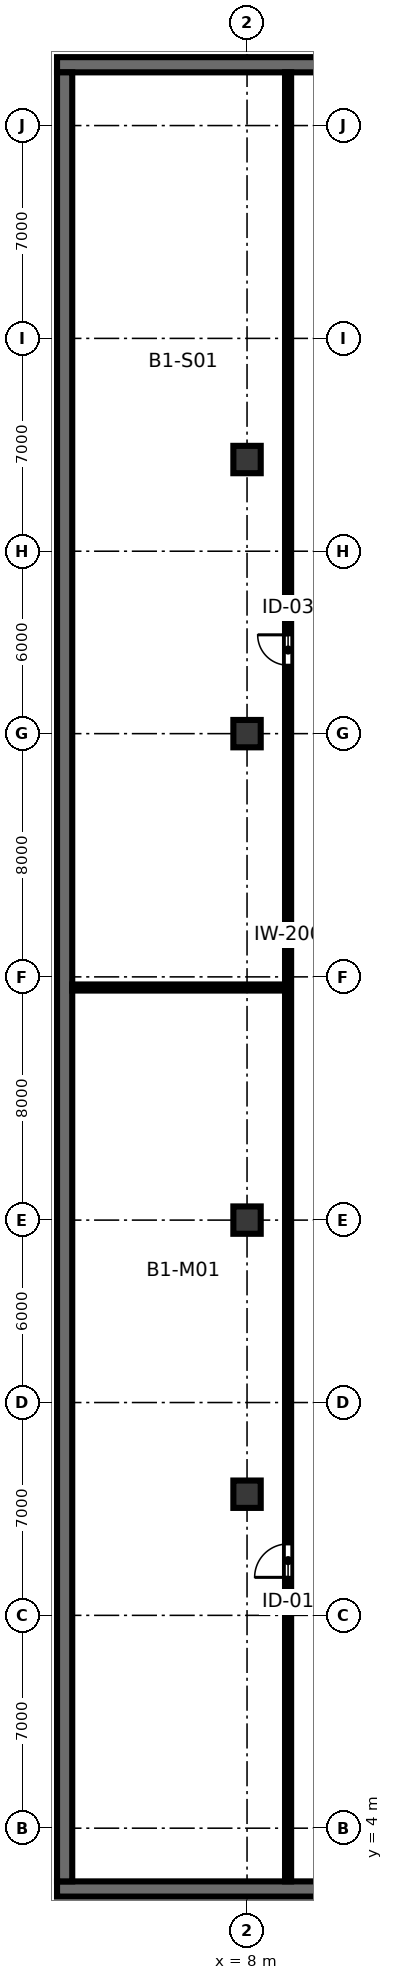
"""IFC4 building model, lengths in metres.
Left out: names, types, materials, properties, quantities, classifications, styles, units other than length and angle.
Written with IfcOpenShell. Run it as: python <this file> out.ifc"""

import sys

from ifc_helpers import new_model, si_unit, direction, frame, frame_2d, origin, origin_2d, place, context, subcontext, project, spatial, rectangle, extrude, element, fill, save


model = new_model("IFC4")
c1 = context("Model", 3, precision=1e-05, world=origin(), true_north=direction((0.0, 1.0)))
c2 = subcontext(c1, "Body", "Model", "MODEL_VIEW")
j1 = project(units=[si_unit("LENGTHUNIT", "METRE"), si_unit("PLANEANGLEUNIT", "RADIAN")], contexts=[c1])
p1 = place(None, origin())
s1 = spatial("IfcSite", under=j1, at=p1, CompositionType="ELEMENT")
p2 = place(p1, origin())
s2 = spatial("IfcBuilding", under=s1, at=p2, CompositionType="ELEMENT")
p3 = place(p2, frame((0.0, 0.0, -4.2)))
s3 = spatial("IfcBuildingStorey", under=s2, at=p3, CompositionType="ELEMENT", Elevation=-4.2)
for number, where, z_axis, x_axis in (
    (1, (1.75, 2.0, 0.0), (0.0, 0.0, 1.0), (1.0, 0.0, 0.0)),
    (2, (1.75, 62.0, 0.0), (0.0, 0.0, 1.0), (1.0, 0.0, 0.0)),
):
    element("IfcWall", number, at=place(p3, frame(where, z_axis=z_axis, x_axis=x_axis)), inside=s3, PredefinedType="SOLIDWALL", context=c2, shape_type="SweptSolid", body=[
        extrude(rectangle(XDim=88.5, YDim=0.5, at=frame_2d((44.25, 0.0))), origin(), (0.0, 0.0, 1.0), 3.85),
    ])
p4 = place(p3, frame((2.0, 2.25, 0.0), z_axis=(0.0, 0.0, 1.0), x_axis=(0.0, 1.0, 0.0)))
e3 = element("IfcWall", 3, at=p4, inside=s3, PredefinedType="SOLIDWALL", context=c2, shape_type="SweptSolid", body=[
    extrude(rectangle(XDim=59.5, YDim=0.5, at=frame_2d((29.75, 0.0))), origin(), (0.0, 0.0, 1.0), 3.85),
])
for number, where, z_axis, x_axis in (
    (4, (8.0, 14.984, 0.0), (0.0, 0.0, 1.0), (1.0, 0.0, 0.0)),
    (5, (8.0, 24.0, 0.0), (0.0, 0.0, 1.0), (1.0, 0.0, 0.0)),
    (6, (8.0, 40.0, 0.0), (0.0, 0.0, 1.0), (1.0, 0.0, 0.0)),
    (7, (8.0, 49.016, 0.0), (0.0, 0.0, 1.0), (1.0, 0.0, 0.0)),
):
    element("IfcColumn", number, at=place(p3, frame(where, z_axis=z_axis, x_axis=x_axis)), inside=s3, PredefinedType="COLUMN", context=c2, shape_type="SweptSolid", body=[
        extrude(rectangle(XDim=0.9, YDim=0.9, at=origin_2d()), origin(), (0.0, 0.0, 1.0), 3.848),
    ])
p5 = place(p3, frame((9.35, 2.25, 0.0), z_axis=(0.0, 0.0, 1.0), x_axis=(0.0, 1.0, 0.0)))
e8 = element("IfcWall", 8, at=p5, inside=s3, PredefinedType="PARTITIONING", context=c2, shape_type="SweptSolid", body=[
    extrude(rectangle(XDim=59.5, YDim=0.2, at=frame_2d((29.75, 0.0))), origin(), (0.0, 0.0, 1.0), 2.95),
])
p6 = place(p5, frame((10.0, 0.0, 0.0)))
e9 = element("IfcOpeningElement", 9, at=p6, cuts=e8, PredefinedType="OPENING", context=c2, shape_type="SweptSolid", body=[
    extrude(rectangle(XDim=1.1, YDim=2.15, at=frame_2d((0.55, 1.075))), frame((0.0, 0.11, 0.0), z_axis=(0.0, -1.0, 0.0), x_axis=(1.0, 0.0, 0.0)), (0.0, 0.0, 1.0), 0.22),
])
p7 = place(p5, frame((40.0, 0.0, 0.0)))
e10 = element("IfcOpeningElement", 10, at=p7, cuts=e8, PredefinedType="OPENING", context=c2, shape_type="SweptSolid", body=[
    extrude(rectangle(XDim=1.0, YDim=2.15, at=frame_2d((0.5, 1.075))), frame((0.0, 0.11, 0.0), z_axis=(0.0, -1.0, 0.0), x_axis=(1.0, 0.0, 0.0)), (0.0, 0.0, 1.0), 0.22),
])
p8 = place(p3, frame((2.25, 31.65, 0.0), z_axis=(0.0, 0.0, 1.0), x_axis=(1.0, 0.0, 0.0)))
e11 = element("IfcWall", 11, at=p8, inside=s3, PredefinedType="PARTITIONING", context=c2, shape_type="SweptSolid", body=[
    extrude(rectangle(XDim=7.1, YDim=0.2, at=frame_2d((3.55, 0.0))), origin(), (0.0, 0.0, 1.0), 2.95),
])
p9 = place(p6, origin())
e12 = element("IfcDoor", 12, at=p9, inside=s3, OperationType="SINGLE_SWING_LEFT", PredefinedType="DOOR", context=c2, shape_type="SweptSolid", body=[
    extrude(rectangle(XDim=1.1, YDim=2.15, at=frame_2d((0.55, 1.075))), frame((0.0, 0.025, 0.0), z_axis=(0.0, -1.0, 0.0), x_axis=(1.0, 0.0, 0.0)), (0.0, 0.0, 1.0), 0.05),
])
fill(e9, e12)
p10 = place(p7, origin())
e13 = element("IfcDoor", 13, at=p10, inside=s3, OperationType="SINGLE_SWING_RIGHT", PredefinedType="DOOR", context=c2, shape_type="SweptSolid", body=[
    extrude(rectangle(XDim=1.0, YDim=2.15, at=frame_2d((0.5, 1.075))), frame((0.0, 0.025, 0.0), z_axis=(0.0, -1.0, 0.0), x_axis=(1.0, 0.0, 0.0)), (0.0, 0.0, 1.0), 0.05),
])
fill(e10, e13)
save(model, sys.argv[1])
